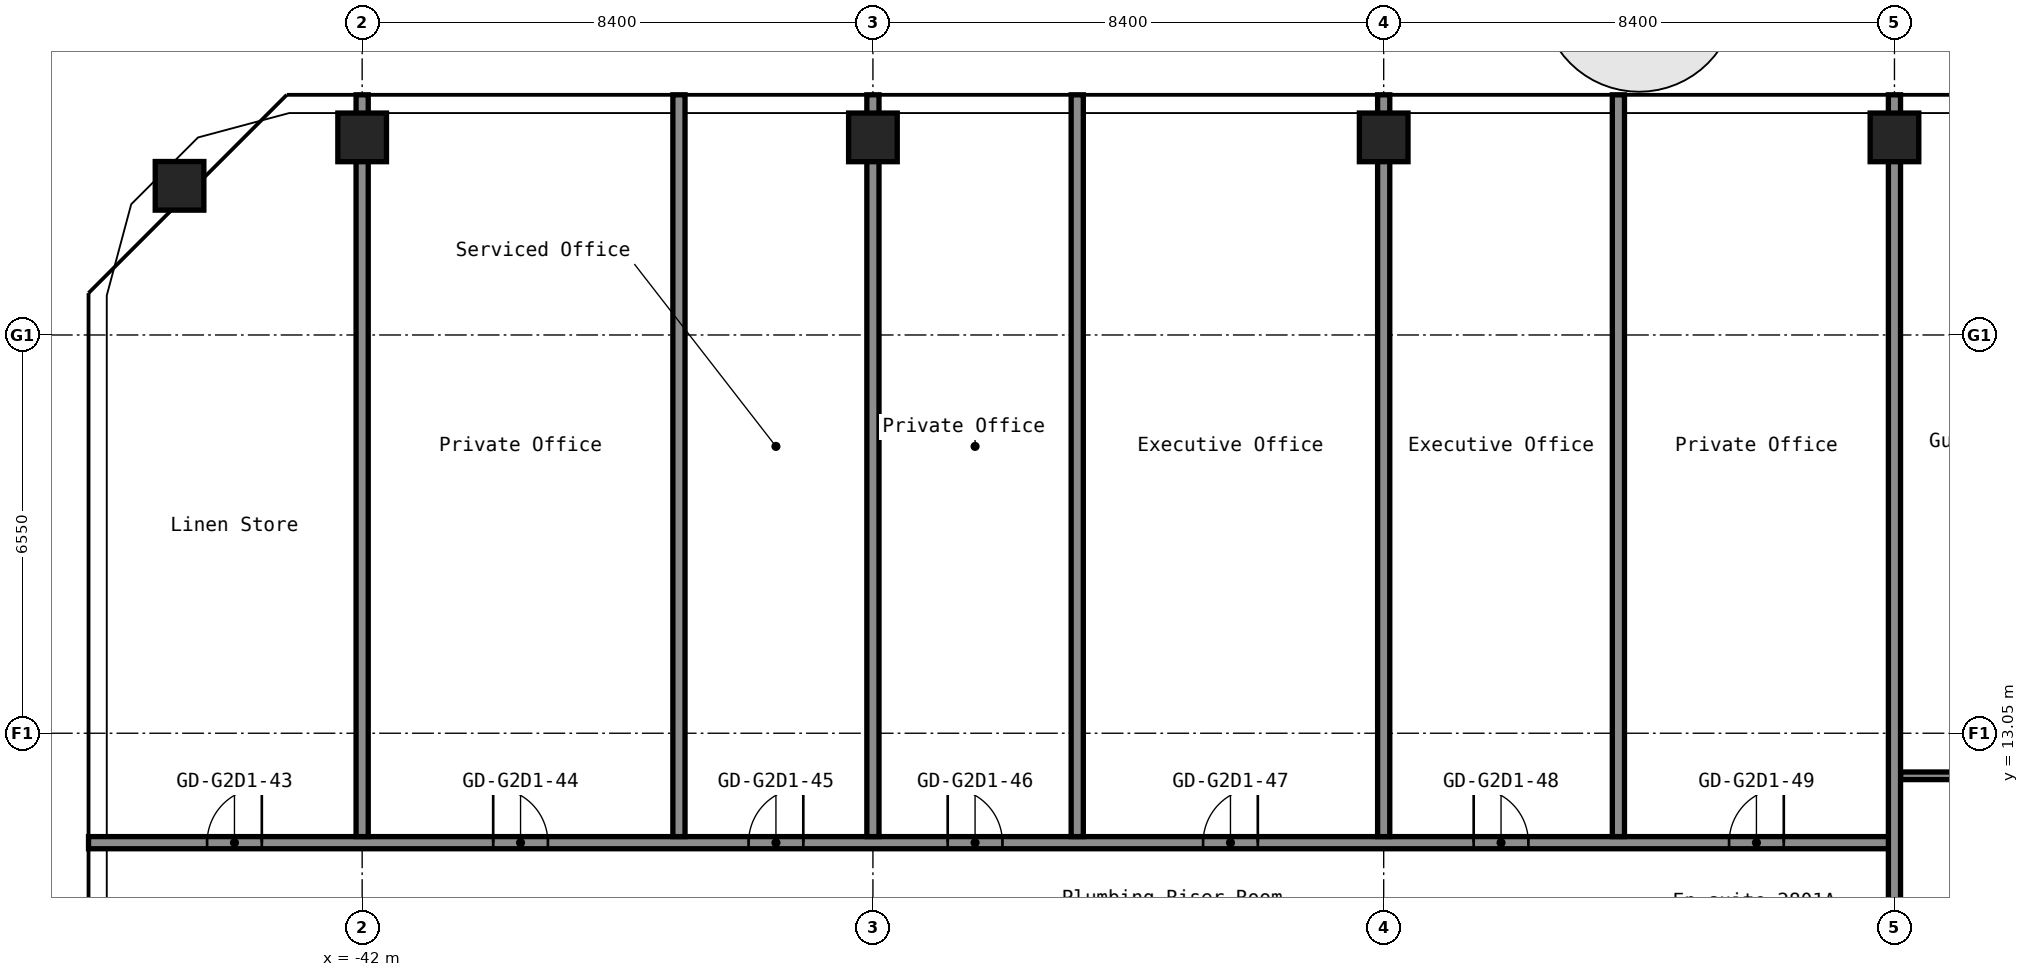
"""IFC4 building model, lengths in metres.
Left out: names, types, materials, properties, quantities, classifications, styles, units other than length and angle.
Written with IfcOpenShell. Run it as: python <this file> out.ifc"""

import sys

from ifc_helpers import new_model, si_unit, direction, frame, frame_2d, origin, origin_2d, place, context, subcontext, project, spatial, rectangle, hollow_rectangle, extrude, element, fill, save


model = new_model("IFC4")
c1 = context("Model", 3, precision=1e-05, world=origin(), true_north=direction((0.0, 1.0)))
c2 = subcontext(c1, "Body", "Model", "MODEL_VIEW")
j1 = project(units=[si_unit("LENGTHUNIT", "METRE"), si_unit("PLANEANGLEUNIT", "RADIAN")], contexts=[c1])
p1 = place(None, origin())
s1 = spatial("IfcSite", under=j1, at=p1, CompositionType="ELEMENT")
p2 = place(p1, origin())
s2 = spatial("IfcBuilding", under=s1, at=p2, CompositionType="ELEMENT")
p3 = place(p2, frame((0.0, 0.0, 101.0)))
s3 = spatial("IfcBuildingStorey", under=s2, at=p3, CompositionType="ELEMENT", Elevation=101.0)
for number, where, z_axis, x_axis in (
    (1, (-45.003, 22.053, 0.0), (0.0, 0.0, 1.0), (1.0, 0.0, 0.0)),
    (2, (-42.0, 22.85, 0.0), (0.0, 0.0, 1.0), (1.0, 0.0, 0.0)),
    (3, (-33.6, 22.85, 0.0), (0.0, 0.0, 1.0), (1.0, 0.0, 0.0)),
    (4, (-25.2, 22.85, 0.0), (0.0, 0.0, 1.0), (1.0, 0.0, 0.0)),
    (5, (-16.8, 22.85, 0.0), (0.0, 0.0, 1.0), (1.0, 0.0, 0.0)),
):
    element("IfcColumn", number, at=place(p3, frame(where, z_axis=z_axis, x_axis=x_axis)), inside=s3, PredefinedType="COLUMN", context=c2, shape_type="SweptSolid", body=[
        extrude(hollow_rectangle(XDim=0.8, YDim=0.8, WallThickness=0.032, at=origin_2d()), origin(), (0.0, 0.0, 1.0), 2.8),
    ])
p4 = place(p3, frame((-46.5, 11.25, 0.0), z_axis=(0.0, 0.0, 1.0), x_axis=(1.0, 0.0, 0.0)))
e6 = element("IfcWall", 6, at=p4, inside=s3, PredefinedType="PARTITIONING", context=c2, shape_type="SweptSolid", body=[
    extrude(rectangle(XDim=29.7, YDim=0.2, at=frame_2d((14.85, 0.0))), origin(), (0.0, 0.0, 1.0), 2.8),
])
p5 = place(p4, frame((1.95, 0.0, 0.0)))
e7 = element("IfcOpeningElement", 7, at=p5, cuts=e6, PredefinedType="OPENING", context=c2, shape_type="SweptSolid", body=[
    extrude(rectangle(XDim=0.9, YDim=2.1, at=frame_2d((0.45, 1.05))), frame((0.0, 0.11, 0.0), z_axis=(0.0, -1.0, 0.0), x_axis=(1.0, 0.0, 0.0)), (0.0, 0.0, 1.0), 0.22),
])
p6 = place(p4, frame((6.655, 0.0, 0.0)))
e8 = element("IfcOpeningElement", 8, at=p6, cuts=e6, PredefinedType="OPENING", context=c2, shape_type="SweptSolid", body=[
    extrude(rectangle(XDim=0.9, YDim=2.1, at=frame_2d((0.45, 1.05))), frame((0.0, 0.11, 0.0), z_axis=(0.0, -1.0, 0.0), x_axis=(1.0, 0.0, 0.0)), (0.0, 0.0, 1.0), 0.22),
])
p7 = place(p4, frame((10.855, 0.0, 0.0)))
e9 = element("IfcOpeningElement", 9, at=p7, cuts=e6, PredefinedType="OPENING", context=c2, shape_type="SweptSolid", body=[
    extrude(rectangle(XDim=0.9, YDim=2.1, at=frame_2d((0.45, 1.05))), frame((0.0, 0.11, 0.0), z_axis=(0.0, -1.0, 0.0), x_axis=(1.0, 0.0, 0.0)), (0.0, 0.0, 1.0), 0.22),
])
p8 = place(p4, frame((14.13, 0.0, 0.0)))
e10 = element("IfcOpeningElement", 10, at=p8, cuts=e6, PredefinedType="OPENING", context=c2, shape_type="SweptSolid", body=[
    extrude(rectangle(XDim=0.9, YDim=2.1, at=frame_2d((0.45, 1.05))), frame((0.0, 0.11, 0.0), z_axis=(0.0, -1.0, 0.0), x_axis=(1.0, 0.0, 0.0)), (0.0, 0.0, 1.0), 0.22),
])
p9 = place(p4, frame((18.33, 0.0, 0.0)))
e11 = element("IfcOpeningElement", 11, at=p9, cuts=e6, PredefinedType="OPENING", context=c2, shape_type="SweptSolid", body=[
    extrude(rectangle(XDim=0.9, YDim=2.1, at=frame_2d((0.45, 1.05))), frame((0.0, 0.11, 0.0), z_axis=(0.0, -1.0, 0.0), x_axis=(1.0, 0.0, 0.0)), (0.0, 0.0, 1.0), 0.22),
])
p10 = place(p4, frame((22.78, 0.0, 0.0)))
e12 = element("IfcOpeningElement", 12, at=p10, cuts=e6, PredefinedType="OPENING", context=c2, shape_type="SweptSolid", body=[
    extrude(rectangle(XDim=0.9, YDim=2.1, at=frame_2d((0.45, 1.05))), frame((0.0, 0.11, 0.0), z_axis=(0.0, -1.0, 0.0), x_axis=(1.0, 0.0, 0.0)), (0.0, 0.0, 1.0), 0.22),
])
p11 = place(p4, frame((26.98, 0.0, 0.0)))
e13 = element("IfcOpeningElement", 13, at=p11, cuts=e6, PredefinedType="OPENING", context=c2, shape_type="SweptSolid", body=[
    extrude(rectangle(XDim=0.9, YDim=2.1, at=frame_2d((0.45, 1.05))), frame((0.0, 0.11, 0.0), z_axis=(0.0, -1.0, 0.0), x_axis=(1.0, 0.0, 0.0)), (0.0, 0.0, 1.0), 0.22),
])
p12 = place(p3, frame((-16.7, 12.35, 0.0), z_axis=(0.0, 0.0, 1.0), x_axis=(1.0, 0.0, 0.0)))
e14 = element("IfcWall", 14, at=p12, inside=s3, PredefinedType="PARTITIONING", context=c2, shape_type="SweptSolid", body=[
    extrude(rectangle(XDim=2.337, YDim=0.125, at=frame_2d((1.169, 0.0))), origin(), (0.0, 0.0, 1.0), 2.8),
])
for number, where, z_axis, x_axis in (
    (15, (-42.0, 11.35, 0.0), (0.0, 0.0, 1.0), (0.0, 1.0, 0.0)),
    (16, (-36.79, 11.35, 0.0), (0.0, 0.0, 1.0), (0.0, 1.0, 0.0)),
    (17, (-33.6, 11.35, 0.0), (0.0, 0.0, 1.0), (0.0, 1.0, 0.0)),
    (18, (-30.24, 11.35, 0.0), (0.0, 0.0, 1.0), (0.0, 1.0, 0.0)),
    (19, (-25.2, 11.35, 0.0), (0.0, 0.0, 1.0), (0.0, 1.0, 0.0)),
    (20, (-21.34, 11.35, 0.0), (0.0, 0.0, 1.0), (0.0, 1.0, 0.0)),
):
    element("IfcWall", number, at=place(p3, frame(where, z_axis=z_axis, x_axis=x_axis)), inside=s3, PredefinedType="PARTITIONING", context=c2, shape_type="SweptSolid", body=[
        extrude(rectangle(XDim=12.2, YDim=0.2, at=frame_2d((6.1, 0.0))), origin(), (0.0, 0.0, 1.0), 2.8),
    ])
p13 = place(p3, frame((-16.8, 10.19, 0.0), z_axis=(0.0, 0.0, 1.0), x_axis=(0.0, 1.0, 0.0)))
e21 = element("IfcWall", 21, at=p13, inside=s3, PredefinedType="PARTITIONING", context=c2, shape_type="SweptSolid", body=[
    extrude(rectangle(XDim=13.36, YDim=0.2, at=frame_2d((6.68, 0.0))), origin(), (0.0, 0.0, 1.0), 2.8),
])
p14 = place(p5, origin())
e22 = element("IfcDoor", 22, at=p14, inside=s3, OperationType="SINGLE_SWING_LEFT", PredefinedType="DOOR", context=c2, shape_type="SweptSolid", body=[
    extrude(rectangle(XDim=0.9, YDim=2.1, at=frame_2d((0.45, 1.05))), frame((0.0, 0.025, 0.0), z_axis=(0.0, -1.0, 0.0), x_axis=(1.0, 0.0, 0.0)), (0.0, 0.0, 1.0), 0.05),
])
fill(e7, e22)
p15 = place(p6, origin())
e23 = element("IfcDoor", 23, at=p15, inside=s3, OperationType="SINGLE_SWING_RIGHT", PredefinedType="DOOR", context=c2, shape_type="SweptSolid", body=[
    extrude(rectangle(XDim=0.9, YDim=2.1, at=frame_2d((0.45, 1.05))), frame((0.0, 0.025, 0.0), z_axis=(0.0, -1.0, 0.0), x_axis=(1.0, 0.0, 0.0)), (0.0, 0.0, 1.0), 0.05),
])
fill(e8, e23)
p16 = place(p7, origin())
e24 = element("IfcDoor", 24, at=p16, inside=s3, OperationType="SINGLE_SWING_LEFT", PredefinedType="DOOR", context=c2, shape_type="SweptSolid", body=[
    extrude(rectangle(XDim=0.9, YDim=2.1, at=frame_2d((0.45, 1.05))), frame((0.0, 0.025, 0.0), z_axis=(0.0, -1.0, 0.0), x_axis=(1.0, 0.0, 0.0)), (0.0, 0.0, 1.0), 0.05),
])
fill(e9, e24)
p17 = place(p8, origin())
e25 = element("IfcDoor", 25, at=p17, inside=s3, OperationType="SINGLE_SWING_RIGHT", PredefinedType="DOOR", context=c2, shape_type="SweptSolid", body=[
    extrude(rectangle(XDim=0.9, YDim=2.1, at=frame_2d((0.45, 1.05))), frame((0.0, 0.025, 0.0), z_axis=(0.0, -1.0, 0.0), x_axis=(1.0, 0.0, 0.0)), (0.0, 0.0, 1.0), 0.05),
])
fill(e10, e25)
p18 = place(p9, origin())
e26 = element("IfcDoor", 26, at=p18, inside=s3, OperationType="SINGLE_SWING_LEFT", PredefinedType="DOOR", context=c2, shape_type="SweptSolid", body=[
    extrude(rectangle(XDim=0.9, YDim=2.1, at=frame_2d((0.45, 1.05))), frame((0.0, 0.025, 0.0), z_axis=(0.0, -1.0, 0.0), x_axis=(1.0, 0.0, 0.0)), (0.0, 0.0, 1.0), 0.05),
])
fill(e11, e26)
p19 = place(p10, origin())
e27 = element("IfcDoor", 27, at=p19, inside=s3, OperationType="SINGLE_SWING_RIGHT", PredefinedType="DOOR", context=c2, shape_type="SweptSolid", body=[
    extrude(rectangle(XDim=0.9, YDim=2.1, at=frame_2d((0.45, 1.05))), frame((0.0, 0.025, 0.0), z_axis=(0.0, -1.0, 0.0), x_axis=(1.0, 0.0, 0.0)), (0.0, 0.0, 1.0), 0.05),
])
fill(e12, e27)
p20 = place(p11, origin())
e28 = element("IfcDoor", 28, at=p20, inside=s3, OperationType="SINGLE_SWING_LEFT", PredefinedType="DOOR", context=c2, shape_type="SweptSolid", body=[
    extrude(rectangle(XDim=0.9, YDim=2.1, at=frame_2d((0.45, 1.05))), frame((0.0, 0.025, 0.0), z_axis=(0.0, -1.0, 0.0), x_axis=(1.0, 0.0, 0.0)), (0.0, 0.0, 1.0), 0.05),
])
fill(e13, e28)
save(model, sys.argv[1])
